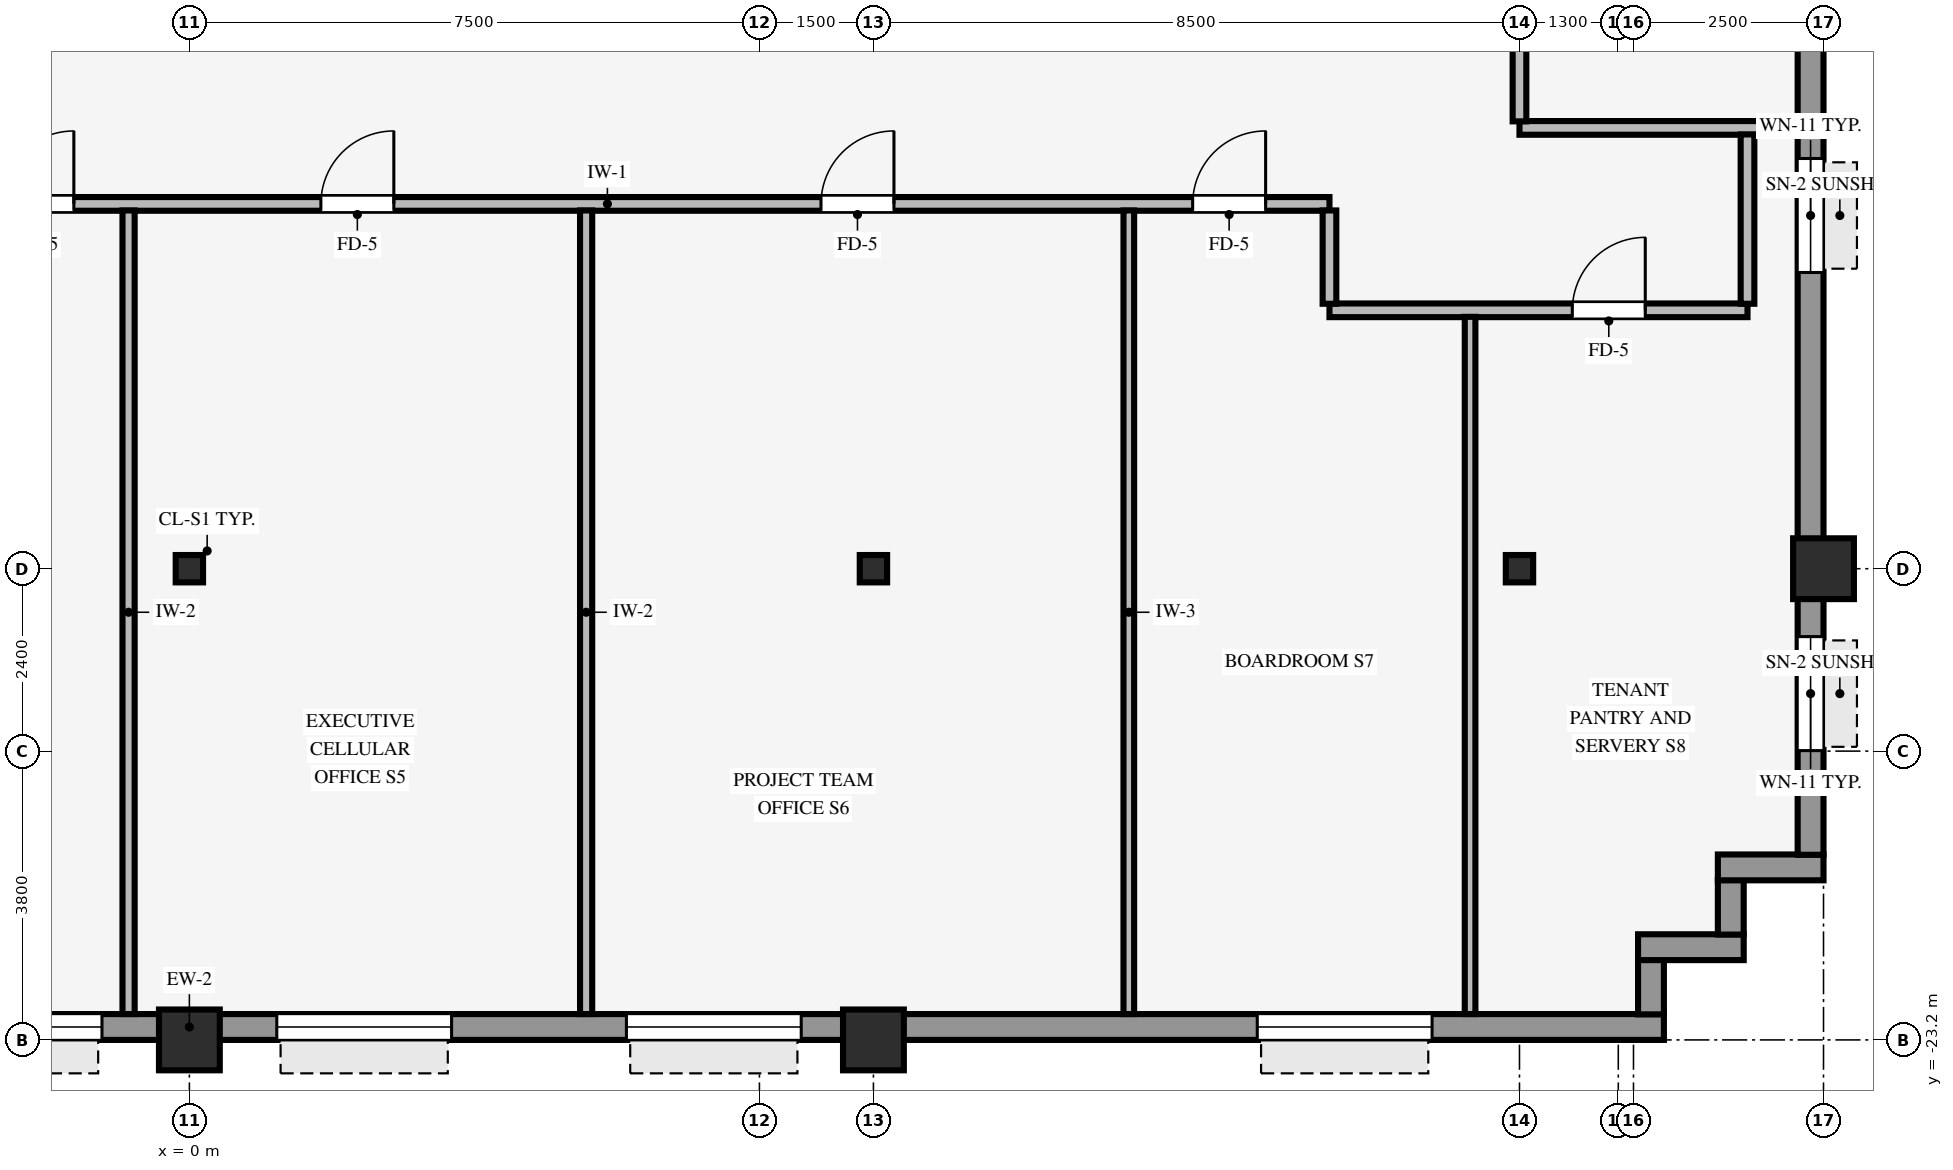
"""IFC4 building model, lengths in metres.
Left out: names, types, materials, properties, quantities, classifications, styles, units other than length and angle.
Written with IfcOpenShell. Run it as: python <this file> out.ifc"""

import sys

from ifc_helpers import new_model, si_unit, direction, frame, frame_2d, origin, origin_2d, place, context, subcontext, project, spatial, rectangle, hollow_rectangle, i_section, extrude, source, transform, mapped, element, fill, save


model = new_model("IFC4")
c1 = context("Model", 3, precision=1e-05, world=origin(), true_north=direction((0.0, 1.0)))
c2 = subcontext(c1, "Body", "Model", "MODEL_VIEW")
j1 = project(units=[si_unit("LENGTHUNIT", "METRE"), si_unit("PLANEANGLEUNIT", "RADIAN")], contexts=[c1])
p1 = place(None, origin())
s1 = spatial("IfcSite", under=j1, at=p1, CompositionType="ELEMENT")
p2 = place(p1, origin())
s2 = spatial("IfcBuilding", under=s1, at=p2, CompositionType="ELEMENT")
p3 = place(p2, frame((0.0, 0.0, 75.05)))
s3 = spatial("IfcBuildingStorey", under=s2, at=p3, CompositionType="ELEMENT", Elevation=75.05)
for number, where, z_axis, x_axis in (
    (1, (21.5, -17.0, 0.0), (0.0, 0.0, 1.0), (1.0, 0.0, 0.0)),
    (2, (0.0, -23.2, 0.0), (0.0, 0.0, 1.0), (1.0, 0.0, 0.0)),
    (3, (9.0, -23.2, 0.0), (0.0, 0.0, 1.0), (1.0, 0.0, 0.0)),
):
    element("IfcColumn", number, at=place(p3, frame(where, z_axis=z_axis, x_axis=x_axis)), inside=s3, PredefinedType="COLUMN", context=c2, shape_type="SweptSolid", body=[
        extrude(hollow_rectangle(XDim=0.8, YDim=0.8, WallThickness=0.055, InnerFilletRadius=0.055, OuterFilletRadius=0.11, at=origin_2d()), origin(), (0.0, 0.0, 1.0), 3.37),
    ])
for number, where, z_axis, x_axis in (
    (4, (0.0, -17.0, 0.0), (0.0, 0.0, 1.0), (1.0, 0.0, 0.0)),
    (5, (9.0, -17.0, 0.0), (0.0, 0.0, 1.0), (1.0, 0.0, 0.0)),
    (6, (17.5, -17.0, 0.0), (0.0, 0.0, 1.0), (1.0, 0.0, 0.0)),
):
    element("IfcColumn", number, at=place(p3, frame(where, z_axis=z_axis, x_axis=x_axis)), inside=s3, PredefinedType="COLUMN", context=c2, shape_type="SweptSolid", body=[
        extrude(i_section(OverallWidth=0.36, OverallDepth=0.36, WebThickness=0.021, FlangeThickness=0.021, FilletRadius=0.018, at=origin_2d()), origin(), (0.0, 0.0, 1.0), 3.37),
    ])
p4 = place(p3, frame((-19.4, -23.03, 0.0), z_axis=(0.0, 0.0, 1.0), x_axis=(1.0, 0.0, 0.0)))
e7 = element("IfcWall", 7, at=p4, inside=s3, PredefinedType="STANDARD", context=c2, shape_type="SweptSolid", body=[
    extrude(rectangle(XDim=38.8, YDim=0.34, at=frame_2d((19.4, 0.0))), origin(), (0.0, 0.0, 1.0), 2.705),
])
p5 = place(p4, frame((2.15, 0.0, 0.8)))
e8 = element("IfcOpeningElement", 8, at=p5, cuts=e7, PredefinedType="OPENING", context=c2, shape_type="SweptSolid", body=[
    extrude(rectangle(XDim=2.3, YDim=1.62, at=frame_2d((1.15, 0.81))), frame((0.0, 0.18, 0.0), z_axis=(0.0, -1.0, 0.0), x_axis=(1.0, 0.0, 0.0)), (0.0, 0.0, 1.0), 0.36),
])
p6 = place(p4, frame((6.75, 0.0, 0.8)))
e9 = element("IfcOpeningElement", 9, at=p6, cuts=e7, PredefinedType="OPENING", context=c2, shape_type="SweptSolid", body=[
    extrude(rectangle(XDim=2.3, YDim=1.62, at=frame_2d((1.15, 0.81))), frame((0.0, 0.18, 0.0), z_axis=(0.0, -1.0, 0.0), x_axis=(1.0, 0.0, 0.0)), (0.0, 0.0, 1.0), 0.36),
])
p7 = place(p4, frame((11.35, 0.0, 0.8)))
e10 = element("IfcOpeningElement", 10, at=p7, cuts=e7, PredefinedType="OPENING", context=c2, shape_type="SweptSolid", body=[
    extrude(rectangle(XDim=2.3, YDim=1.62, at=frame_2d((1.15, 0.81))), frame((0.0, 0.18, 0.0), z_axis=(0.0, -1.0, 0.0), x_axis=(1.0, 0.0, 0.0)), (0.0, 0.0, 1.0), 0.36),
])
p8 = place(p4, frame((15.95, 0.0, 0.8)))
e11 = element("IfcOpeningElement", 11, at=p8, cuts=e7, PredefinedType="OPENING", context=c2, shape_type="SweptSolid", body=[
    extrude(rectangle(XDim=2.3, YDim=1.62, at=frame_2d((1.15, 0.81))), frame((0.0, 0.18, 0.0), z_axis=(0.0, -1.0, 0.0), x_axis=(1.0, 0.0, 0.0)), (0.0, 0.0, 1.0), 0.36),
])
p9 = place(p4, frame((20.55, 0.0, 0.8)))
e12 = element("IfcOpeningElement", 12, at=p9, cuts=e7, PredefinedType="OPENING", context=c2, shape_type="SweptSolid", body=[
    extrude(rectangle(XDim=2.3, YDim=1.62, at=frame_2d((1.15, 0.81))), frame((0.0, 0.18, 0.0), z_axis=(0.0, -1.0, 0.0), x_axis=(1.0, 0.0, 0.0)), (0.0, 0.0, 1.0), 0.36),
])
p10 = place(p4, frame((25.15, 0.0, 0.8)))
e13 = element("IfcOpeningElement", 13, at=p10, cuts=e7, PredefinedType="OPENING", context=c2, shape_type="SweptSolid", body=[
    extrude(rectangle(XDim=2.3, YDim=1.62, at=frame_2d((1.15, 0.81))), frame((0.0, 0.18, 0.0), z_axis=(0.0, -1.0, 0.0), x_axis=(1.0, 0.0, 0.0)), (0.0, 0.0, 1.0), 0.36),
])
p11 = place(p4, frame((33.45, 0.0, 0.8)))
e14 = element("IfcOpeningElement", 14, at=p11, cuts=e7, PredefinedType="OPENING", context=c2, shape_type="SweptSolid", body=[
    extrude(rectangle(XDim=2.3, YDim=1.62, at=frame_2d((1.15, 0.81))), frame((0.0, 0.18, 0.0), z_axis=(0.0, -1.0, 0.0), x_axis=(1.0, 0.0, 0.0)), (0.0, 0.0, 1.0), 0.36),
])
p12 = place(p3, frame((19.23, -22.864, 0.0), z_axis=(0.0, 0.0, 1.0), x_axis=(0.0, 1.0, 0.0)))
e15 = element("IfcWall", 15, at=p12, inside=s3, PredefinedType="STANDARD", context=c2, shape_type="SweptSolid", body=[
    extrude(rectangle(XDim=0.718, YDim=0.34, at=frame_2d((0.359, 0.0))), origin(), (0.0, 0.0, 1.0), 3.36),
])
p13 = place(p3, frame((19.06, -21.98, 0.0), z_axis=(0.0, 0.0, 1.0), x_axis=(1.0, 0.0, 0.0)))
e16 = element("IfcWall", 16, at=p13, inside=s3, PredefinedType="STANDARD", context=c2, shape_type="SweptSolid", body=[
    extrude(rectangle(XDim=1.39, YDim=0.34, at=frame_2d((0.695, 0.0))), origin(), (0.0, 0.0, 1.0), 3.36),
])
p14 = place(p3, frame((20.28, -21.814, 0.0), z_axis=(0.0, 0.0, 1.0), x_axis=(0.0, 1.0, 0.0)))
e17 = element("IfcWall", 17, at=p14, inside=s3, PredefinedType="STANDARD", context=c2, shape_type="SweptSolid", body=[
    extrude(rectangle(XDim=0.718, YDim=0.34, at=frame_2d((0.359, 0.0))), origin(), (0.0, 0.0, 1.0), 3.36),
])
p15 = place(p3, frame((20.11, -20.93, 0.0), z_axis=(0.0, 0.0, 1.0), x_axis=(1.0, 0.0, 0.0)))
e18 = element("IfcWall", 18, at=p15, inside=s3, PredefinedType="STANDARD", context=c2, shape_type="SweptSolid", body=[
    extrude(rectangle(XDim=1.39, YDim=0.34, at=frame_2d((0.695, 0.0))), origin(), (0.0, 0.0, 1.0), 3.36),
])
p16 = place(p3, frame((21.33, -20.764, 0.0), z_axis=(0.0, 0.0, 1.0), x_axis=(0.0, 1.0, 0.0)))
e19 = element("IfcWall", 19, at=p16, inside=s3, PredefinedType="STANDARD", context=c2, shape_type="SweptSolid", body=[
    extrude(rectangle(XDim=41.528, YDim=0.34, at=frame_2d((20.764, 0.0))), origin(), (0.0, 0.0, 1.0), 2.705),
])
p17 = place(p16, frame((26.014, 0.0, 0.0), z_axis=(0.0, 0.0, 1.0), x_axis=(-1.0, 0.0, 0.0)))
e20 = element("IfcOpeningElement", 20, at=p17, cuts=e19, PredefinedType="OPENING", context=c2, shape_type="SweptSolid", body=[
    extrude(rectangle(XDim=1.05, YDim=2.1, at=frame_2d((0.525, 1.05))), frame((0.0, 0.18, 0.0), z_axis=(0.0, -1.0, 0.0), x_axis=(1.0, 0.0, 0.0)), (0.0, 0.0, 1.0), 0.36),
])
p18 = place(p16, frame((1.371, 0.0, 0.8)))
e21 = element("IfcOpeningElement", 21, at=p18, cuts=e19, PredefinedType="OPENING", context=c2, shape_type="SweptSolid", body=[
    extrude(rectangle(XDim=1.5, YDim=1.6, at=frame_2d((0.75, 0.8))), frame((0.0, 0.18, 0.0), z_axis=(0.0, -1.0, 0.0), x_axis=(1.0, 0.0, 0.0)), (0.0, 0.0, 1.0), 0.36),
])
p19 = place(p16, frame((7.662, 0.0, 0.8)))
e22 = element("IfcOpeningElement", 22, at=p19, cuts=e19, PredefinedType="OPENING", context=c2, shape_type="SweptSolid", body=[
    extrude(rectangle(XDim=1.5, YDim=1.6, at=frame_2d((0.75, 0.8))), frame((0.0, 0.18, 0.0), z_axis=(0.0, -1.0, 0.0), x_axis=(1.0, 0.0, 0.0)), (0.0, 0.0, 1.0), 0.36),
])
p20 = place(p16, frame((12.603, 0.0, 0.8)))
e23 = element("IfcOpeningElement", 23, at=p20, cuts=e19, PredefinedType="OPENING", context=c2, shape_type="SweptSolid", body=[
    extrude(rectangle(XDim=1.5, YDim=1.6, at=frame_2d((0.75, 0.8))), frame((0.0, 0.18, 0.0), z_axis=(0.0, -1.0, 0.0), x_axis=(1.0, 0.0, 0.0)), (0.0, 0.0, 1.0), 0.36),
])
p21 = place(p16, frame((17.543, 0.0, 0.8)))
e24 = element("IfcOpeningElement", 24, at=p21, cuts=e19, PredefinedType="OPENING", context=c2, shape_type="SweptSolid", body=[
    extrude(rectangle(XDim=1.5, YDim=1.6, at=frame_2d((0.75, 0.8))), frame((0.0, 0.18, 0.0), z_axis=(0.0, -1.0, 0.0), x_axis=(1.0, 0.0, 0.0)), (0.0, 0.0, 1.0), 0.36),
])
p22 = place(p16, frame((22.485, 0.0, 0.8)))
e25 = element("IfcOpeningElement", 25, at=p22, cuts=e19, PredefinedType="OPENING", context=c2, shape_type="SweptSolid", body=[
    extrude(rectangle(XDim=1.5, YDim=1.6, at=frame_2d((0.75, 0.8))), frame((0.0, 0.18, 0.0), z_axis=(0.0, -1.0, 0.0), x_axis=(1.0, 0.0, 0.0)), (0.0, 0.0, 1.0), 0.36),
])
p23 = place(p16, frame((27.426, 0.0, 0.8)))
e26 = element("IfcOpeningElement", 26, at=p23, cuts=e19, PredefinedType="OPENING", context=c2, shape_type="SweptSolid", body=[
    extrude(rectangle(XDim=1.5, YDim=1.6, at=frame_2d((0.75, 0.8))), frame((0.0, 0.18, 0.0), z_axis=(0.0, -1.0, 0.0), x_axis=(1.0, 0.0, 0.0)), (0.0, 0.0, 1.0), 0.36),
])
p24 = place(p16, frame((32.366, 0.0, 0.8)))
e27 = element("IfcOpeningElement", 27, at=p24, cuts=e19, PredefinedType="OPENING", context=c2, shape_type="SweptSolid", body=[
    extrude(rectangle(XDim=1.5, YDim=1.6, at=frame_2d((0.75, 0.8))), frame((0.0, 0.18, 0.0), z_axis=(0.0, -1.0, 0.0), x_axis=(1.0, 0.0, 0.0)), (0.0, 0.0, 1.0), 0.36),
])
p25 = place(p16, frame((38.657, 0.0, 0.8)))
e28 = element("IfcOpeningElement", 28, at=p25, cuts=e19, PredefinedType="OPENING", context=c2, shape_type="SweptSolid", body=[
    extrude(rectangle(XDim=1.5, YDim=1.6, at=frame_2d((0.75, 0.8))), frame((0.0, 0.18, 0.0), z_axis=(0.0, -1.0, 0.0), x_axis=(1.0, 0.0, 0.0)), (0.0, 0.0, 1.0), 0.36),
])
p26 = place(p3, frame((15.0, -13.6, 0.0), z_axis=(0.0, 0.0, 1.0), x_axis=(1.0, 0.0, 0.0)))
e29 = element("IfcWall", 29, at=p26, inside=s3, PredefinedType="PARTITIONING", context=c2, shape_type="SweptSolid", body=[
    extrude(rectangle(XDim=5.5, YDim=0.18, at=frame_2d((2.75, 0.0))), origin(), (0.0, 0.0, 1.0), 2.942),
])
p27 = place(p26, frame((3.195, 0.0, 0.0)))
e30 = element("IfcOpeningElement", 30, at=p27, cuts=e29, PredefinedType="OPENING", context=c2, shape_type="SweptSolid", body=[
    extrude(rectangle(XDim=0.96, YDim=2.1, at=frame_2d((0.48, 1.05))), frame((0.0, 0.1, 0.0), z_axis=(0.0, -1.0, 0.0), x_axis=(1.0, 0.0, 0.0)), (0.0, 0.0, 1.0), 0.2),
])
p28 = place(p3, frame((-15.0, -12.2, 0.0), z_axis=(0.0, 0.0, 1.0), x_axis=(1.0, 0.0, 0.0)))
e31 = element("IfcWall", 31, at=p28, inside=s3, PredefinedType="PARTITIONING", context=c2, shape_type="SweptSolid", body=[
    extrude(rectangle(XDim=30.0, YDim=0.18, at=frame_2d((15.0, 0.0))), origin(), (0.0, 0.0, 1.0), 3.36),
])
p29 = place(p28, frame((23.31, 0.0, 0.0)))
e32 = element("IfcOpeningElement", 32, at=p29, cuts=e31, PredefinedType="OPENING", context=c2, shape_type="SweptSolid", body=[
    extrude(rectangle(XDim=0.96, YDim=2.1, at=frame_2d((0.48, 1.05))), frame((0.0, 0.1, 0.0), z_axis=(0.0, -1.0, 0.0), x_axis=(1.0, 0.0, 0.0)), (0.0, 0.0, 1.0), 0.2),
])
p30 = place(p28, frame((16.73, 0.0, 0.0)))
e33 = element("IfcOpeningElement", 33, at=p30, cuts=e31, PredefinedType="OPENING", context=c2, shape_type="SweptSolid", body=[
    extrude(rectangle(XDim=0.96, YDim=2.1, at=frame_2d((0.48, 1.05))), frame((0.0, 0.1, 0.0), z_axis=(0.0, -1.0, 0.0), x_axis=(1.0, 0.0, 0.0)), (0.0, 0.0, 1.0), 0.2),
])
p31 = place(p28, frame((7.095, 0.0, 0.0)))
e34 = element("IfcOpeningElement", 34, at=p31, cuts=e31, PredefinedType="OPENING", context=c2, shape_type="SweptSolid", body=[
    extrude(rectangle(XDim=0.96, YDim=2.1, at=frame_2d((0.48, 1.05))), frame((0.0, 0.1, 0.0), z_axis=(0.0, -1.0, 0.0), x_axis=(1.0, 0.0, 0.0)), (0.0, 0.0, 1.0), 0.2),
])
p32 = place(p28, frame((2.645, 0.0, 0.0)))
e35 = element("IfcOpeningElement", 35, at=p32, cuts=e31, PredefinedType="OPENING", context=c2, shape_type="SweptSolid", body=[
    extrude(rectangle(XDim=0.96, YDim=2.1, at=frame_2d((0.48, 1.05))), frame((0.0, 0.1, 0.0), z_axis=(0.0, -1.0, 0.0), x_axis=(1.0, 0.0, 0.0)), (0.0, 0.0, 1.0), 0.2),
])
p33 = place(p28, frame((28.2, 0.0, 0.0)))
e36 = element("IfcOpeningElement", 36, at=p33, cuts=e31, PredefinedType="OPENING", context=c2, shape_type="SweptSolid", body=[
    extrude(rectangle(XDim=0.96, YDim=2.1, at=frame_2d((0.48, 1.05))), frame((0.0, 0.1, 0.0), z_axis=(0.0, -1.0, 0.0), x_axis=(1.0, 0.0, 0.0)), (0.0, 0.0, 1.0), 0.2),
])
p34 = place(p28, frame((12.52, 0.0, 0.0)))
e37 = element("IfcOpeningElement", 37, at=p34, cuts=e31, PredefinedType="OPENING", context=c2, shape_type="SweptSolid", body=[
    extrude(rectangle(XDim=0.96, YDim=2.1, at=frame_2d((0.48, 1.05))), frame((0.0, 0.1, 0.0), z_axis=(0.0, -1.0, 0.0), x_axis=(1.0, 0.0, 0.0)), (0.0, 0.0, 1.0), 0.2),
])
p35 = place(p3, frame((17.5, -11.2, 0.0), z_axis=(0.0, 0.0, 1.0), x_axis=(1.0, 0.0, 0.0)))
e38 = element("IfcWall", 38, at=p35, inside=s3, PredefinedType="PARTITIONING", context=c2, shape_type="SweptSolid", body=[
    extrude(rectangle(XDim=3.66, YDim=0.18, at=frame_2d((1.83, 0.0))), origin(), (0.0, 0.0, 1.0), 3.36),
])
for number, where, z_axis, x_axis in (
    (39, (-0.8, -22.86, 0.0), (0.0, 0.0, 1.0), (0.0, 1.0, 0.0)),
    (40, (5.22, -22.86, 0.0), (0.0, 0.0, 1.0), (0.0, 1.0, 0.0)),
):
    element("IfcWall", number, at=place(p3, frame(where, z_axis=z_axis, x_axis=x_axis)), inside=s3, PredefinedType="PARTITIONING", context=c2, shape_type="SweptSolid", body=[
        extrude(rectangle(XDim=10.574, YDim=0.16, at=frame_2d((5.287, 0.0))), origin(), (0.0, 0.0, 1.0), 3.36),
    ])
p36 = place(p3, frame((12.36, -22.86, 0.0), z_axis=(0.0, 0.0, 1.0), x_axis=(0.0, 1.0, 0.0)))
e41 = element("IfcWall", 41, at=p36, inside=s3, PredefinedType="PARTITIONING", context=c2, shape_type="SweptSolid", body=[
    extrude(rectangle(XDim=10.574, YDim=0.14, at=frame_2d((5.287, 0.0))), origin(), (0.0, 0.0, 1.0), 3.36),
])
p37 = place(p3, frame((15.0, -13.514, 0.0), z_axis=(0.0, 0.0, 1.0), x_axis=(0.0, 1.0, 0.0)))
e42 = element("IfcWall", 42, at=p37, inside=s3, PredefinedType="PARTITIONING", context=c2, shape_type="SweptSolid", body=[
    extrude(rectangle(XDim=1.228, YDim=0.18, at=frame_2d((0.614, 0.0))), origin(), (0.0, 0.0, 1.0), 3.36),
])
p38 = place(p3, frame((16.85, -22.86, 0.0), z_axis=(0.0, 0.0, 1.0), x_axis=(0.0, 1.0, 0.0)))
e43 = element("IfcWall", 43, at=p38, inside=s3, PredefinedType="PARTITIONING", context=c2, shape_type="SweptSolid", body=[
    extrude(rectangle(XDim=9.174, YDim=0.14, at=frame_2d((4.587, 0.0))), origin(), (0.0, 0.0, 1.0), 3.36),
])
p39 = place(p3, frame((17.5, -11.114, 0.0), z_axis=(0.0, 0.0, 1.0), x_axis=(0.0, 1.0, 0.0)))
e44 = element("IfcWall", 44, at=p39, inside=s3, PredefinedType="PARTITIONING", context=c2, shape_type="SweptSolid", body=[
    extrude(rectangle(XDim=0.968, YDim=0.18, at=frame_2d((0.484, 0.0))), origin(), (0.0, 0.0, 1.0), 2.738),
])
p40 = place(p3, frame((20.5, -13.514, 0.0), z_axis=(0.0, 0.0, 1.0), x_axis=(0.0, 1.0, 0.0)))
e45 = element("IfcWall", 45, at=p40, inside=s3, PredefinedType="PARTITIONING", context=c2, shape_type="SweptSolid", body=[
    extrude(rectangle(XDim=2.228, YDim=0.18, at=frame_2d((1.114, 0.0))), origin(), (0.0, 0.0, 1.0), 3.36),
])
m1 = source(origin(), c2, "Body", "SweptSolid", [
    extrude(rectangle(XDim=2.3, YDim=1.62, at=frame_2d((1.15, 0.81))), frame((0.0, 0.03, 0.0), z_axis=(0.0, -1.0, 0.0), x_axis=(1.0, 0.0, 0.0)), (0.0, 0.0, 1.0), 0.06),
])
p41 = place(p8, origin())
e46 = element("IfcWindow", 46, at=p41, inside=s3, PartitioningType="SINGLE_PANEL", PredefinedType="WINDOW", context=c2, shape_type="MappedRepresentation", body=[
    mapped(m1, transform((0.0, 0.0, 0.0), scale=1.0)),
])
fill(e11, e46)
p42 = place(p9, origin())
e47 = element("IfcWindow", 47, at=p42, inside=s3, PartitioningType="SINGLE_PANEL", PredefinedType="WINDOW", context=c2, shape_type="MappedRepresentation", body=[
    mapped(m1, transform((0.0, 0.0, 0.0), scale=1.0)),
])
fill(e12, e47)
p43 = place(p10, origin())
e48 = element("IfcWindow", 48, at=p43, inside=s3, PartitioningType="SINGLE_PANEL", PredefinedType="WINDOW", context=c2, shape_type="MappedRepresentation", body=[
    mapped(m1, transform((0.0, 0.0, 0.0), scale=1.0)),
])
fill(e13, e48)
p44 = place(p11, origin())
e49 = element("IfcWindow", 49, at=p44, inside=s3, PartitioningType="SINGLE_PANEL", PredefinedType="WINDOW", context=c2, shape_type="MappedRepresentation", body=[
    mapped(m1, transform((0.0, 0.0, 0.0), scale=1.0)),
])
fill(e14, e49)
m2 = source(origin(), c2, "Body", "SweptSolid", [
    extrude(rectangle(XDim=1.5, YDim=1.6, at=frame_2d((0.75, 0.8))), frame((0.0, 0.03, 0.0), z_axis=(0.0, -1.0, 0.0), x_axis=(1.0, 0.0, 0.0)), (0.0, 0.0, 1.0), 0.06),
])
p45 = place(p18, origin())
e50 = element("IfcWindow", 50, at=p45, inside=s3, PartitioningType="SINGLE_PANEL", PredefinedType="WINDOW", context=c2, shape_type="MappedRepresentation", body=[
    mapped(m2, transform((0.0, 0.0, 0.0), scale=1.0)),
])
fill(e21, e50)
p46 = place(p19, origin())
e51 = element("IfcWindow", 51, at=p46, inside=s3, PartitioningType="SINGLE_PANEL", PredefinedType="WINDOW", context=c2, shape_type="MappedRepresentation", body=[
    mapped(m2, transform((0.0, 0.0, 0.0), scale=1.0)),
])
fill(e22, e51)
m3 = source(origin(), c2, "Body", "SweptSolid", [
    extrude(rectangle(XDim=0.96, YDim=2.1, at=frame_2d((0.48, 1.05))), frame((0.0, 0.025, 0.0), z_axis=(0.0, -1.0, 0.0), x_axis=(1.0, 0.0, 0.0)), (0.0, 0.0, 1.0), 0.05),
])
p47 = place(p29, origin())
e52 = element("IfcDoor", 52, at=p47, inside=s3, OperationType="SINGLE_SWING_RIGHT", PredefinedType="DOOR", context=c2, shape_type="MappedRepresentation", body=[
    mapped(m3, transform((0.0, 0.0, 0.0), scale=1.0)),
])
fill(e32, e52)
p48 = place(p30, origin())
e53 = element("IfcDoor", 53, at=p48, inside=s3, OperationType="SINGLE_SWING_RIGHT", PredefinedType="DOOR", context=c2, shape_type="MappedRepresentation", body=[
    mapped(m3, transform((0.0, 0.0, 0.0), scale=1.0)),
])
fill(e33, e53)
p49 = place(p27, origin())
e54 = element("IfcDoor", 54, at=p49, inside=s3, OperationType="SINGLE_SWING_RIGHT", PredefinedType="DOOR", context=c2, shape_type="MappedRepresentation", body=[
    mapped(m3, transform((0.0, 0.0, 0.0), scale=1.0)),
])
fill(e30, e54)
p50 = place(p33, origin())
e55 = element("IfcDoor", 55, at=p50, inside=s3, OperationType="SINGLE_SWING_RIGHT", PredefinedType="DOOR", context=c2, shape_type="MappedRepresentation", body=[
    mapped(m3, transform((0.0, 0.0, 0.0), scale=1.0)),
])
fill(e36, e55)
p51 = place(p34, origin())
e56 = element("IfcDoor", 56, at=p51, inside=s3, OperationType="SINGLE_SWING_RIGHT", PredefinedType="DOOR", context=c2, shape_type="MappedRepresentation", body=[
    mapped(m3, transform((0.0, 0.0, 0.0), scale=1.0)),
])
fill(e37, e56)
save(model, sys.argv[1])
